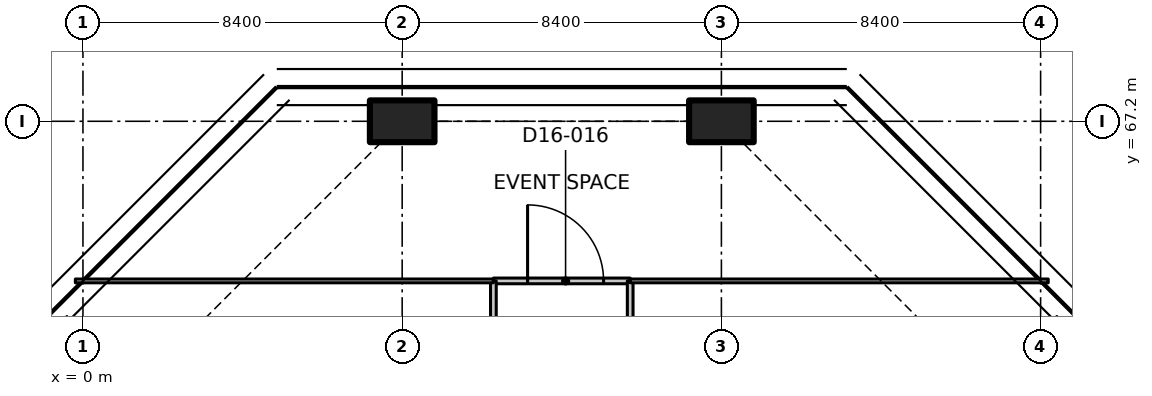
"""IFC4 building model, lengths in metres.
Left out: names, types, materials, properties, quantities, classifications, styles, units other than length and angle.
Written with IfcOpenShell. Run it as: python <this file> out.ifc"""

import sys

from ifc_helpers import new_model, si_unit, direction, frame, frame_2d, origin, origin_2d, place, context, subcontext, project, spatial, polyline, rectangle, outline, extrude, element, fill, save


model = new_model("IFC4")
c1 = context("Model", 3, precision=1e-05, world=origin(), true_north=direction((0.0, 1.0)))
c2 = subcontext(c1, "Body", "Model", "MODEL_VIEW")
j1 = project(units=[si_unit("LENGTHUNIT", "METRE"), si_unit("PLANEANGLEUNIT", "RADIAN")], contexts=[c1])
p1 = place(None, origin())
s1 = spatial("IfcSite", under=j1, at=p1, CompositionType="ELEMENT")
p2 = place(p1, origin())
s2 = spatial("IfcBuilding", under=s1, at=p2, CompositionType="ELEMENT")
p3 = place(p2, frame((0.0, 0.0, 127.7)))
s3 = spatial("IfcBuildingStorey", under=s2, at=p3, CompositionType="ELEMENT", Elevation=127.7)
for number, where, z_axis, x_axis in (
    (1, (8.4, 67.2, 0.0), (0.0, 0.0, 1.0), (0.0, 1.0, 0.0)),
    (2, (16.8, 67.2, 0.0), (0.0, 0.0, 1.0), (0.0, 1.0, 0.0)),
):
    element("IfcColumn", number, at=place(p3, frame(where, z_axis=z_axis, x_axis=x_axis)), inside=s3, PredefinedType="COLUMN", context=c2, shape_type="SweptSolid", body=[
        extrude(rectangle(XDim=1.1, YDim=1.7, at=origin_2d()), origin(), (0.0, 0.0, 1.0), 3.35),
    ])
p4 = place(p3, frame((10.8, 63.0, 0.0), z_axis=(0.0, 0.0, 1.0), x_axis=(1.0, 0.0, 0.0)))
e3 = element("IfcWall", 3, at=p4, inside=s3, PredefinedType="PARTITIONING", context=c2, shape_type="SweptSolid", body=[
    extrude(rectangle(XDim=3.6, YDim=0.15, at=frame_2d((1.8, 0.0))), origin(), (0.0, 0.0, 1.0), 3.33),
])
p5 = place(p4, frame((0.9, 0.0, 0.0)))
e4 = element("IfcOpeningElement", 4, at=p5, cuts=e3, PredefinedType="OPENING", context=c2, shape_type="SweptSolid", body=[
    extrude(rectangle(XDim=2.0, YDim=2.4, at=frame_2d((1.0, 1.2))), frame((0.0, 0.085, 0.0), z_axis=(0.0, -1.0, 0.0), x_axis=(1.0, 0.0, 0.0)), (0.0, 0.0, 1.0), 0.17),
])
p6 = place(p3, frame((10.8, 58.8, 0.0), z_axis=(0.0, 0.0, 1.0), x_axis=(0.0, 1.0, 0.0)))
e5 = element("IfcWall", 5, at=p6, inside=s3, PredefinedType="PARTITIONING", context=c2, shape_type="SweptSolid", body=[
    extrude(rectangle(XDim=4.2, YDim=0.15, at=frame_2d((2.1, 0.0))), origin(), (0.0, 0.0, 1.0), 3.33),
])
p7 = place(p6, frame((1.5, 0.0, 0.0)))
e6 = element("IfcOpeningElement", 6, at=p7, cuts=e5, PredefinedType="OPENING", context=c2, shape_type="SweptSolid", body=[
    extrude(rectangle(XDim=1.1, YDim=2.1, at=frame_2d((0.55, 1.05))), frame((0.0, 0.085, 0.0), z_axis=(0.0, -1.0, 0.0), x_axis=(1.0, 0.0, 0.0)), (0.0, 0.0, 1.0), 0.17),
])
p8 = place(p3, frame((14.4, 63.0, 0.0), z_axis=(0.0, 0.0, 1.0), x_axis=(0.0, -1.0, 0.0)))
e7 = element("IfcWall", 7, at=p8, inside=s3, PredefinedType="PARTITIONING", context=c2, shape_type="SweptSolid", body=[
    extrude(rectangle(XDim=8.4, YDim=0.15, at=frame_2d((4.2, 0.0))), origin(), (0.0, 0.0, 1.0), 3.33),
])
p9 = place(p8, frame((3.3, 0.0, 0.0)))
e8 = element("IfcOpeningElement", 8, at=p9, cuts=e7, PredefinedType="OPENING", context=c2, shape_type="SweptSolid", body=[
    extrude(rectangle(XDim=1.6, YDim=2.1, at=frame_2d((0.8, 1.05))), frame((0.0, 0.085, 0.0), z_axis=(0.0, -1.0, 0.0), x_axis=(1.0, 0.0, 0.0)), (0.0, 0.0, 1.0), 0.17),
])
p10 = place(p3, frame((10.8, 63.0, 0.0), z_axis=(0.0, 0.0, 1.0), x_axis=(-1.0, 0.0, 0.0)))
e9 = element("IfcWall", 9, at=p10, inside=s3, PredefinedType="PARTITIONING", context=c2, shape_type="SweptSolid", body=[
    extrude(outline(polyline([(0.0, 0.0), (11.0, 0.0), (11.0, 3.33), (7.266, 3.33), (7.264, 2.98), (5.936, 2.98), (5.934, 3.33), (0.0, 3.33), (0.0, 0.0)])), frame((0.0, 0.05, 0.0), z_axis=(0.0, -1.0, 0.0), x_axis=(1.0, 0.0, 0.0)), (0.0, 0.0, 1.0), 0.1),
])
p11 = place(p3, frame((25.4, 63.0, 0.0), z_axis=(0.0, 0.0, 1.0), x_axis=(-1.0, 0.0, 0.0)))
e10 = element("IfcWall", 10, at=p11, inside=s3, PredefinedType="PARTITIONING", context=c2, shape_type="SweptSolid", body=[
    extrude(outline(polyline([(0.0, 0.0), (11.0, 0.0), (11.0, 3.33), (5.066, 3.33), (5.064, 2.98), (3.736, 2.98), (3.734, 3.33), (0.0, 3.33), (0.0, 0.0)])), frame((0.0, 0.05, 0.0), z_axis=(0.0, -1.0, 0.0), x_axis=(1.0, 0.0, 0.0)), (0.0, 0.0, 1.0), 0.1),
])
p12 = place(p5, origin())
e11 = element("IfcDoor", 11, at=p12, inside=s3, OperationType="DOUBLE_DOOR_SINGLE_SWING", PredefinedType="DOOR", context=c2, shape_type="SweptSolid", body=[
    extrude(rectangle(XDim=2.0, YDim=2.4, at=frame_2d((1.0, 1.2))), frame((0.0, 0.025, 0.0), z_axis=(0.0, -1.0, 0.0), x_axis=(1.0, 0.0, 0.0)), (0.0, 0.0, 1.0), 0.05),
])
fill(e4, e11)
save(model, sys.argv[1])
